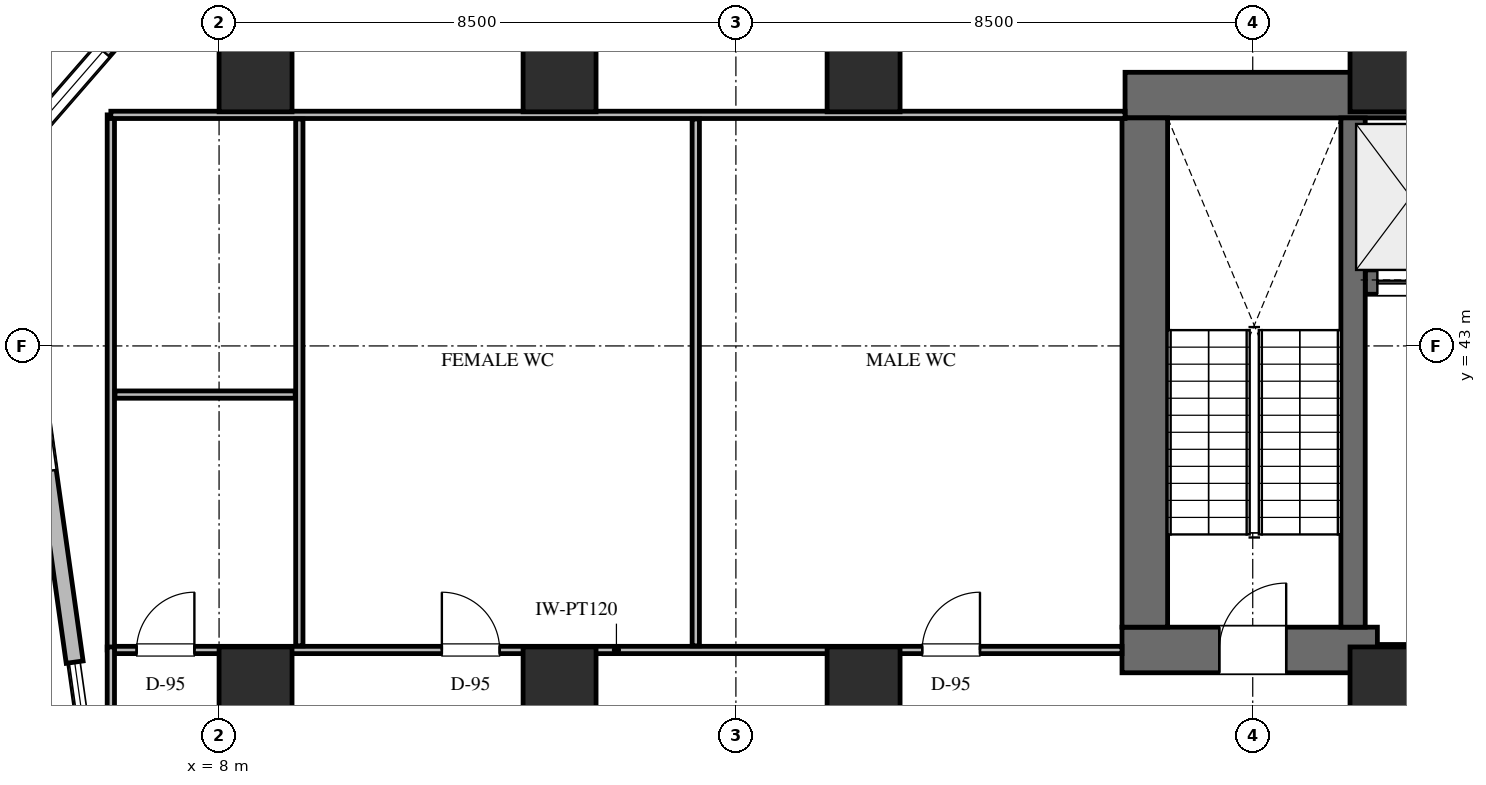
"""IFC4 building model, lengths in metres.
Left out: names, types, materials, properties, quantities, classifications, styles, units other than length and angle.
Written with IfcOpenShell. Run it as: python <this file> out.ifc"""

import sys

from ifc_helpers import new_model, si_unit, direction, frame, frame_2d, origin, origin_2d, place, context, subcontext, project, spatial, rectangle, extrude, element, fill, save


model = new_model("IFC4")
c1 = context("Model", 3, precision=1e-05, world=origin(), true_north=direction((0.0, 1.0)))
c2 = subcontext(c1, "Body", "Model", "MODEL_VIEW")
j1 = project(units=[si_unit("LENGTHUNIT", "METRE"), si_unit("PLANEANGLEUNIT", "RADIAN")], contexts=[c1])
p1 = place(None, origin())
s1 = spatial("IfcSite", under=j1, at=p1, CompositionType="ELEMENT")
p2 = place(p1, origin())
s2 = spatial("IfcBuilding", under=s1, at=p2, CompositionType="ELEMENT")
p3 = place(p2, frame((0.0, 0.0, 91.5)))
s3 = spatial("IfcBuildingStorey", under=s2, at=p3, CompositionType="ELEMENT", Elevation=91.5)
p4 = place(p3, frame((22.9, 47.125, 0.0), z_axis=(0.0, 0.0, 1.0), x_axis=(1.0, 0.0, 0.0)))
e1 = element("IfcWall", 1, at=p4, inside=s3, PredefinedType="SHEAR", context=c2, shape_type="SweptSolid", body=[
    extrude(rectangle(XDim=43.7, YDim=0.75, at=frame_2d((21.85, 0.0))), origin(), (0.0, 0.0, 1.0), 4.5),
])
p5 = place(p3, frame((26.85, 44.05, 0.0), z_axis=(0.0, 0.0, 1.0), x_axis=(1.0, 0.0, 0.0)))
e2 = element("IfcWall", 2, at=p5, inside=s3, PredefinedType="SHEAR", context=c2, shape_type="SweptSolid", body=[
    extrude(rectangle(XDim=7.95, YDim=0.4, at=frame_2d((3.975, 0.0))), origin(), (0.0, 0.0, 1.0), 4.5),
])
p6 = place(p5, frame((0.2, 0.0, 0.0)))
e3 = element("IfcOpeningElement", 3, at=p6, cuts=e2, PredefinedType="OPENING", context=c2, shape_type="SweptSolid", body=[
    extrude(rectangle(XDim=1.1, YDim=2.2, at=frame_2d((0.55, 1.1))), frame((0.0, 0.21, 0.0), z_axis=(0.0, -1.0, 0.0), x_axis=(1.0, 0.0, 0.0)), (0.0, 0.0, 1.0), 0.42),
])
p7 = place(p5, frame((2.2, 0.0, 0.0)))
e4 = element("IfcOpeningElement", 4, at=p7, cuts=e2, PredefinedType="OPENING", context=c2, shape_type="SweptSolid", body=[
    extrude(rectangle(XDim=1.1, YDim=2.2, at=frame_2d((0.55, 1.1))), frame((0.0, 0.21, 0.0), z_axis=(0.0, -1.0, 0.0), x_axis=(1.0, 0.0, 0.0)), (0.0, 0.0, 1.0), 0.42),
])
p8 = place(p5, frame((4.2, 0.0, 0.0)))
e5 = element("IfcOpeningElement", 5, at=p8, cuts=e2, PredefinedType="OPENING", context=c2, shape_type="SweptSolid", body=[
    extrude(rectangle(XDim=1.1, YDim=2.2, at=frame_2d((0.55, 1.1))), frame((0.0, 0.21, 0.0), z_axis=(0.0, -1.0, 0.0), x_axis=(1.0, 0.0, 0.0)), (0.0, 0.0, 1.0), 0.42),
])
p9 = place(p5, frame((6.2, 0.0, 0.0)))
e6 = element("IfcOpeningElement", 6, at=p9, cuts=e2, PredefinedType="OPENING", context=c2, shape_type="SweptSolid", body=[
    extrude(rectangle(XDim=1.1, YDim=2.2, at=frame_2d((0.55, 1.1))), frame((0.0, 0.21, 0.0), z_axis=(0.0, -1.0, 0.0), x_axis=(1.0, 0.0, 0.0)), (0.0, 0.0, 1.0), 0.42),
])
p10 = place(p3, frame((22.85, 38.0, 0.0), z_axis=(0.0, 0.0, 1.0), x_axis=(1.0, 0.0, 0.0)))
e7 = element("IfcWall", 7, at=p10, inside=s3, PredefinedType="SHEAR", context=c2, shape_type="SweptSolid", body=[
    extrude(rectangle(XDim=4.2, YDim=0.75, at=frame_2d((2.1, 0.0))), origin(), (0.0, 0.0, 1.0), 4.5),
])
p11 = place(p10, frame((1.6, 0.0, 0.0)))
e8 = element("IfcOpeningElement", 8, at=p11, cuts=e7, PredefinedType="OPENING", context=c2, shape_type="SweptSolid", body=[
    extrude(rectangle(XDim=1.1, YDim=2.2, at=frame_2d((0.55, 1.1))), frame((0.0, 0.385, 0.0), z_axis=(0.0, -1.0, 0.0), x_axis=(1.0, 0.0, 0.0)), (0.0, 0.0, 1.0), 0.77),
])
p12 = place(p3, frame((23.225, 38.375, 0.0), z_axis=(0.0, 0.0, 1.0), x_axis=(0.0, 1.0, 0.0)))
e9 = element("IfcWall", 9, at=p12, inside=s3, PredefinedType="SHEAR", context=c2, shape_type="SweptSolid", body=[
    extrude(rectangle(XDim=8.375, YDim=0.75, at=frame_2d((4.188, 0.0))), origin(), (0.0, 0.0, 1.0), 4.5),
])
p13 = place(p3, frame((26.65, 38.375, 0.0), z_axis=(0.0, 0.0, 1.0), x_axis=(0.0, 1.0, 0.0)))
e10 = element("IfcWall", 10, at=p13, inside=s3, PredefinedType="SHEAR", context=c2, shape_type="SweptSolid", body=[
    extrude(rectangle(XDim=8.375, YDim=0.4, at=frame_2d((4.188, 0.0))), origin(), (0.0, 0.0, 1.0), 4.5),
])
for number, where, z_axis, x_axis in (
    (11, (27.2, 37.35, 0.0), (0.0, 0.0, 1.0), (1.0, 0.0, 0.0)),
    (12, (27.2, 47.55, 0.0), (0.0, 0.0, 1.0), (1.0, 0.0, 0.0)),
    (13, (18.6, 37.35, 0.0), (0.0, 0.0, 1.0), (1.0, 0.0, 0.0)),
    (14, (18.6, 47.55, 0.0), (0.0, 0.0, 1.0), (1.0, 0.0, 0.0)),
    (15, (13.6, 37.35, 0.0), (0.0, 0.0, 1.0), (1.0, 0.0, 0.0)),
    (16, (13.6, 47.55, 0.0), (0.0, 0.0, 1.0), (1.0, 0.0, 0.0)),
    (17, (8.6, 37.35, 0.0), (0.0, 0.0, 1.0), (1.0, 0.0, 0.0)),
    (18, (8.6, 47.55, 0.0), (0.0, 0.0, 1.0), (1.0, 0.0, 0.0)),
):
    element("IfcColumn", number, at=place(p3, frame(where, z_axis=z_axis, x_axis=x_axis)), inside=s3, PredefinedType="COLUMN", context=c2, shape_type="SweptSolid", body=[
        extrude(rectangle(XDim=1.2, YDim=1.4, at=origin_2d()), origin(), (0.0, 0.0, 1.0), 4.5),
    ])
p14 = place(p3, frame((5.625, 37.8, 0.0), z_axis=(0.0, 0.0, 1.0), x_axis=(-0.139180172484, 0.990267074878, 0.0)))
e19 = element("IfcWall", 19, at=p14, inside=s3, PredefinedType="STANDARD", context=c2, shape_type="SweptSolid", body=[
    extrude(rectangle(XDim=8.267, YDim=0.28, at=frame_2d((4.134, 0.0))), origin(), (0.0, 0.0, 1.0), 4.25),
])
p15 = place(p14, frame((3.173, 0.0, 0.65)))
e20 = element("IfcOpeningElement", 20, at=p15, cuts=e19, PredefinedType="OPENING", context=c2, shape_type="SweptSolid", body=[
    extrude(rectangle(XDim=1.8, YDim=2.1, at=frame_2d((0.9, 1.05))), frame((0.0, 0.15, 0.0), z_axis=(0.0, -1.0, 0.0), x_axis=(1.0, 0.0, 0.0)), (0.0, 0.0, 1.0), 0.3),
])
p16 = place(p3, frame((4.474, 45.987, 0.0), z_axis=(0.0, 0.0, 1.0), x_axis=(0.656070053895, 0.754699996278, 0.0)))
e21 = element("IfcWall", 21, at=p16, inside=s3, PredefinedType="STANDARD", context=c2, shape_type="SweptSolid", body=[
    extrude(rectangle(XDim=3.171, YDim=0.28, at=frame_2d((1.585, 0.0))), origin(), (0.0, 0.0, 1.0), 4.25),
])
p17 = place(p16, frame((0.667, 0.0, 0.65)))
e22 = element("IfcOpeningElement", 22, at=p17, cuts=e21, PredefinedType="OPENING", context=c2, shape_type="SweptSolid", body=[
    extrude(rectangle(XDim=1.8, YDim=2.1, at=frame_2d((0.9, 1.05))), frame((0.0, 0.15, 0.0), z_axis=(0.0, -1.0, 0.0), x_axis=(1.0, 0.0, 0.0)), (0.0, 0.0, 1.0), 0.3),
])
p18 = place(p3, frame((27.05, 38.0, 0.0), z_axis=(0.0, 0.0, 1.0), x_axis=(1.0, 0.0, 0.0)))
e23 = element("IfcWall", 23, at=p18, inside=s3, PredefinedType="STANDARD", context=c2, shape_type="SweptSolid", body=[
    extrude(rectangle(XDim=7.95, YDim=0.18, at=frame_2d((3.975, 0.0))), origin(), (0.0, 0.0, 1.0), 3.323),
])
p19 = place(p18, frame((2.25, 0.0, 0.0)))
e24 = element("IfcOpeningElement", 24, at=p19, cuts=e23, PredefinedType="OPENING", context=c2, shape_type="SweptSolid", body=[
    extrude(rectangle(XDim=1.8, YDim=2.2, at=frame_2d((0.9, 1.1))), frame((0.0, 0.1, 0.0), z_axis=(0.0, -1.0, 0.0), x_axis=(1.0, 0.0, 0.0)), (0.0, 0.0, 1.0), 0.2),
])
p20 = place(p3, frame((6.22, 38.0, 0.0), z_axis=(0.0, 0.0, 1.0), x_axis=(1.0, 0.0, 0.0)))
e25 = element("IfcWall", 25, at=p20, inside=s3, PredefinedType="PARTITIONING", context=c2, shape_type="SweptSolid", body=[
    extrude(rectangle(XDim=16.63, YDim=0.12, at=frame_2d((8.315, 0.0))), origin(), (0.0, 0.0, 1.0), 3.323),
])
p21 = place(p20, frame((0.424, 0.0, 0.0)))
e26 = element("IfcOpeningElement", 26, at=p21, cuts=e25, PredefinedType="OPENING", context=c2, shape_type="SweptSolid", body=[
    extrude(rectangle(XDim=0.95, YDim=2.15, at=frame_2d((0.475, 1.075))), frame((0.0, 0.07, 0.0), z_axis=(0.0, -1.0, 0.0), x_axis=(1.0, 0.0, 0.0)), (0.0, 0.0, 1.0), 0.14),
])
p22 = place(p20, frame((5.444, 0.0, 0.0)))
e27 = element("IfcOpeningElement", 27, at=p22, cuts=e25, PredefinedType="OPENING", context=c2, shape_type="SweptSolid", body=[
    extrude(rectangle(XDim=0.95, YDim=2.15, at=frame_2d((0.475, 1.075))), frame((0.0, 0.07, 0.0), z_axis=(0.0, -1.0, 0.0), x_axis=(1.0, 0.0, 0.0)), (0.0, 0.0, 1.0), 0.14),
])
p23 = place(p20, frame((13.344, 0.0, 0.0)))
e28 = element("IfcOpeningElement", 28, at=p23, cuts=e25, PredefinedType="OPENING", context=c2, shape_type="SweptSolid", body=[
    extrude(rectangle(XDim=0.95, YDim=2.15, at=frame_2d((0.475, 1.075))), frame((0.0, 0.07, 0.0), z_axis=(0.0, -1.0, 0.0), x_axis=(1.0, 0.0, 0.0)), (0.0, 0.0, 1.0), 0.14),
])
p24 = place(p3, frame((6.22, 38.0, 0.0), z_axis=(0.0, 0.0, 1.0), x_axis=(0.0, 1.0, 0.0)))
e29 = element("IfcWall", 29, at=p24, inside=s3, PredefinedType="PARTITIONING", context=c2, shape_type="SweptSolid", body=[
    extrude(rectangle(XDim=8.8, YDim=0.12, at=frame_2d((4.4, 0.0))), origin(), (0.0, 0.0, 1.0), 4.25),
])
p25 = place(p3, frame((6.22, 46.8, 0.0), z_axis=(0.0, 0.0, 1.0), x_axis=(1.0, 0.0, 0.0)))
e30 = element("IfcWall", 30, at=p25, inside=s3, PredefinedType="PARTITIONING", context=c2, shape_type="SweptSolid", body=[
    extrude(rectangle(XDim=16.68, YDim=0.12, at=frame_2d((8.34, 0.0))), origin(), (0.0, 0.0, 1.0), 3.323),
])
for number, where, z_axis, x_axis in (
    (31, (9.32, 38.068, 0.0), (0.0, 0.0, 1.0), (0.0, 1.0, 0.0)),
    (32, (15.84, 38.068, 0.0), (0.0, 0.0, 1.0), (0.0, 1.0, 0.0)),
):
    element("IfcWall", number, at=place(p3, frame(where, z_axis=z_axis, x_axis=x_axis)), inside=s3, PredefinedType="PARTITIONING", context=c2, shape_type="SweptSolid", body=[
        extrude(rectangle(XDim=8.664, YDim=0.12, at=frame_2d((4.332, 0.0))), origin(), (0.0, 0.0, 1.0), 4.25),
    ])
p26 = place(p3, frame((6.288, 42.2, 0.0), z_axis=(0.0, 0.0, 1.0), x_axis=(1.0, 0.0, 0.0)))
e33 = element("IfcWall", 33, at=p26, inside=s3, PredefinedType="PARTITIONING", context=c2, shape_type="SweptSolid", body=[
    extrude(rectangle(XDim=2.964, YDim=0.12, at=frame_2d((1.482, 0.0))), origin(), (0.0, 0.0, 1.0), 3.323),
])
p27 = place(p3, frame((6.22, 34.4, 0.0), z_axis=(0.0, 0.0, 1.0), x_axis=(0.0, 1.0, 0.0)))
e34 = element("IfcWall", 34, at=p27, inside=s3, PredefinedType="PARTITIONING", context=c2, shape_type="SweptSolid", body=[
    extrude(rectangle(XDim=3.65, YDim=0.12, at=frame_2d((1.825, 0.0))), origin(), (0.0, 0.0, 1.0), 4.25),
])
p28 = place(p17, origin())
e35 = element("IfcWindow", 35, at=p28, inside=s3, PartitioningType="SINGLE_PANEL", PredefinedType="WINDOW", context=c2, shape_type="SweptSolid", body=[
    extrude(rectangle(XDim=1.8, YDim=2.1, at=frame_2d((0.9, 1.05))), frame((0.0, 0.03, 0.0), z_axis=(0.0, -1.0, 0.0), x_axis=(1.0, 0.0, 0.0)), (0.0, 0.0, 1.0), 0.06),
])
fill(e22, e35)
p29 = place(p11, origin())
e36 = element("IfcDoor", 36, at=p29, inside=s3, OperationType="SINGLE_SWING_RIGHT", PredefinedType="DOOR", context=c2, shape_type="SweptSolid", body=[
    extrude(rectangle(XDim=1.1, YDim=2.2, at=frame_2d((0.55, 1.1))), frame((0.0, 0.025, 0.0), z_axis=(0.0, -1.0, 0.0), x_axis=(1.0, 0.0, 0.0)), (0.0, 0.0, 1.0), 0.05),
])
fill(e8, e36)
p30 = place(p6, origin())
e37 = element("IfcDoor", 37, at=p30, inside=s3, OperationType="DOUBLE_DOOR_SLIDING", PredefinedType="DOOR", context=c2, shape_type="SweptSolid", body=[
    extrude(rectangle(XDim=1.1, YDim=2.2, at=frame_2d((0.55, 1.1))), frame((0.0, 0.025, 0.0), z_axis=(0.0, -1.0, 0.0), x_axis=(1.0, 0.0, 0.0)), (0.0, 0.0, 1.0), 0.05),
])
fill(e3, e37)
p31 = place(p21, origin())
e38 = element("IfcDoor", 38, at=p31, inside=s3, OperationType="SINGLE_SWING_RIGHT", PredefinedType="DOOR", context=c2, shape_type="SweptSolid", body=[
    extrude(rectangle(XDim=0.95, YDim=2.15, at=frame_2d((0.475, 1.075))), frame((0.0, 0.025, 0.0), z_axis=(0.0, -1.0, 0.0), x_axis=(1.0, 0.0, 0.0)), (0.0, 0.0, 1.0), 0.05),
])
fill(e26, e38)
p32 = place(p22, origin())
e39 = element("IfcDoor", 39, at=p32, inside=s3, OperationType="SINGLE_SWING_LEFT", PredefinedType="DOOR", context=c2, shape_type="SweptSolid", body=[
    extrude(rectangle(XDim=0.95, YDim=2.15, at=frame_2d((0.475, 1.075))), frame((0.0, 0.025, 0.0), z_axis=(0.0, -1.0, 0.0), x_axis=(1.0, 0.0, 0.0)), (0.0, 0.0, 1.0), 0.05),
])
fill(e27, e39)
p33 = place(p23, origin())
e40 = element("IfcDoor", 40, at=p33, inside=s3, OperationType="SINGLE_SWING_RIGHT", PredefinedType="DOOR", context=c2, shape_type="SweptSolid", body=[
    extrude(rectangle(XDim=0.95, YDim=2.15, at=frame_2d((0.475, 1.075))), frame((0.0, 0.025, 0.0), z_axis=(0.0, -1.0, 0.0), x_axis=(1.0, 0.0, 0.0)), (0.0, 0.0, 1.0), 0.05),
])
fill(e28, e40)
save(model, sys.argv[1])
